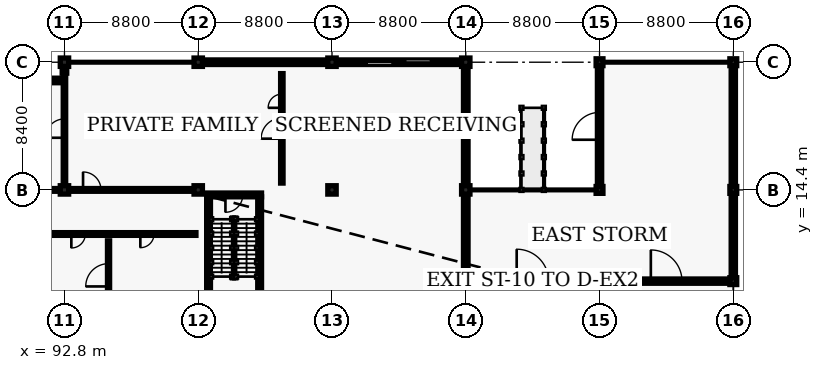
"""IFC4 building model, lengths in metres.
Left out: names, types, materials, properties, quantities, classifications, styles, units other than length and angle.
Written with IfcOpenShell. Run it as: python <this file> out.ifc"""

import sys

from ifc_helpers import new_model, si_unit, direction, frame, frame_2d, origin, origin_2d, place, context, subcontext, project, spatial, rectangle, extrude, element, fill, save


model = new_model("IFC4")
c1 = context("Model", 3, precision=1e-05, world=origin(), true_north=direction((0.0, 1.0)))
c2 = subcontext(c1, "Body", "Model", "MODEL_VIEW")
j1 = project(units=[si_unit("LENGTHUNIT", "METRE"), si_unit("PLANEANGLEUNIT", "RADIAN")], contexts=[c1])
p1 = place(None, origin())
s1 = spatial("IfcSite", under=j1, at=p1, CompositionType="ELEMENT")
p2 = place(p1, origin())
s2 = spatial("IfcBuilding", under=s1, at=p2, CompositionType="ELEMENT")
p3 = place(p2, origin())
s3 = spatial("IfcBuildingStorey", under=s2, at=p3, CompositionType="ELEMENT", Elevation=0.0)
for number, where, z_axis, x_axis in (
    (1, (92.8, 14.4, 0.0), (0.0, 0.0, 1.0), (1.0, 0.0, 0.0)),
    (2, (92.8, 22.8, 0.0), (0.0, 0.0, 1.0), (1.0, 0.0, 0.0)),
    (3, (101.6, 14.4, 0.0), (0.0, 0.0, 1.0), (1.0, 0.0, 0.0)),
    (4, (101.6, 22.8, 0.0), (0.0, 0.0, 1.0), (1.0, 0.0, 0.0)),
    (5, (110.4, 14.4, 0.0), (0.0, 0.0, 1.0), (1.0, 0.0, 0.0)),
    (6, (110.4, 22.8, 0.0), (0.0, 0.0, 1.0), (1.0, 0.0, 0.0)),
    (7, (119.2, 14.4, 0.0), (0.0, 0.0, 1.0), (1.0, 0.0, 0.0)),
    (8, (119.2, 22.8, 0.0), (0.0, 0.0, 1.0), (1.0, 0.0, 0.0)),
):
    element("IfcColumn", number, at=place(p3, frame(where, z_axis=z_axis, x_axis=x_axis)), inside=s3, PredefinedType="COLUMN", context=c2, shape_type="SweptSolid", body=[
        extrude(rectangle(XDim=0.55, YDim=0.55, at=origin_2d()), origin(), (0.0, 0.0, 1.0), 4.8),
    ])
for number, where, z_axis, x_axis in (
    (9, (128.0, 8.4, 0.0), (0.0, 0.0, 1.0), (1.0, 0.0, 0.0)),
    (10, (128.0, 14.4, 0.0), (0.0, 0.0, 1.0), (1.0, 0.0, 0.0)),
    (11, (128.0, 22.8, 0.0), (0.0, 0.0, 1.0), (1.0, 0.0, 0.0)),
    (12, (136.8, 8.4, 0.0), (0.0, 0.0, 1.0), (1.0, 0.0, 0.0)),
    (13, (136.8, 14.4, 0.0), (0.0, 0.0, 1.0), (1.0, 0.0, 0.0)),
    (14, (136.8, 22.8, 0.0), (0.0, 0.0, 1.0), (1.0, 0.0, 0.0)),
    (15, (119.2, 8.4, 0.0), (0.0, 0.0, 1.0), (1.0, 0.0, 0.0)),
):
    element("IfcColumn", number, at=place(p3, frame(where, z_axis=z_axis, x_axis=x_axis)), inside=s3, PredefinedType="COLUMN", context=c2, shape_type="SweptSolid", body=[
        extrude(rectangle(XDim=0.45, YDim=0.45, at=origin_2d()), origin(), (0.0, 0.0, 1.0), 4.8),
    ])
p4 = place(p3, frame((84.1, 21.6, 0.0), z_axis=(0.0, 0.0, 1.0), x_axis=(1.0, 0.0, 0.0)))
e16 = element("IfcWall", 16, at=p4, inside=s3, PredefinedType="SOLIDWALL", context=c2, shape_type="SweptSolid", body=[
    extrude(rectangle(XDim=8.6, YDim=0.3, at=frame_2d((4.3, 0.0))), origin(), (0.0, 0.0, 1.0), 4.35),
])
p5 = place(p4, frame((3.1, 0.0, 0.9)))
e17 = element("IfcOpeningElement", 17, at=p5, cuts=e16, PredefinedType="OPENING", context=c2, shape_type="SweptSolid", body=[
    extrude(rectangle(XDim=2.4, YDim=2.1, at=frame_2d((1.2, 1.05))), frame((0.0, 0.16, 0.0), z_axis=(0.0, -1.0, 0.0), x_axis=(1.0, 0.0, 0.0)), (0.0, 0.0, 1.0), 0.32),
])
p6 = place(p3, frame((101.7, 22.8, 0.0), z_axis=(0.0, 0.0, 1.0), x_axis=(1.0, 0.0, 0.0)))
e18 = element("IfcWall", 18, at=p6, inside=s3, PredefinedType="SOLIDWALL", context=c2, shape_type="SweptSolid", body=[
    extrude(rectangle(XDim=8.6, YDim=0.3, at=frame_2d((4.3, 0.0))), origin(), (0.0, 0.0, 1.0), 4.065),
])
p7 = place(p6, frame((3.1, 0.0, 0.9)))
e19 = element("IfcOpeningElement", 19, at=p7, cuts=e18, PredefinedType="OPENING", context=c2, shape_type="SweptSolid", body=[
    extrude(rectangle(XDim=2.4, YDim=2.1, at=frame_2d((1.2, 1.05))), frame((0.0, 0.16, 0.0), z_axis=(0.0, -1.0, 0.0), x_axis=(1.0, 0.0, 0.0)), (0.0, 0.0, 1.0), 0.32),
])
p8 = place(p3, frame((110.5, 22.8, 0.0), z_axis=(0.0, 0.0, 1.0), x_axis=(1.0, 0.0, 0.0)))
e20 = element("IfcWall", 20, at=p8, inside=s3, PredefinedType="SOLIDWALL", context=c2, shape_type="SweptSolid", body=[
    extrude(rectangle(XDim=8.6, YDim=0.3, at=frame_2d((4.3, 0.0))), origin(), (0.0, 0.0, 1.0), 4.065),
])
p9 = place(p8, frame((2.2, 0.0, 0.0)))
e21 = element("IfcOpeningElement", 21, at=p9, cuts=e20, PredefinedType="OPENING", context=c2, shape_type="SweptSolid", body=[
    extrude(rectangle(XDim=4.2, YDim=3.6, at=frame_2d((2.1, 1.8))), frame((0.0, 0.16, 0.0), z_axis=(0.0, -1.0, 0.0), x_axis=(1.0, 0.0, 0.0)), (0.0, 0.0, 1.0), 0.32),
])
for number, where, z_axis, x_axis in (
    (22, (119.2, 6.1, 0.0), (0.0, 0.0, 1.0), (0.0, 1.0, 0.0)),
    (23, (119.2, 14.5, 0.0), (0.0, 0.0, 1.0), (0.0, 1.0, 0.0)),
):
    element("IfcWall", number, at=place(p3, frame(where, z_axis=z_axis, x_axis=x_axis)), inside=s3, PredefinedType="SOLIDWALL", context=c2, shape_type="SweptSolid", body=[
        extrude(rectangle(XDim=8.2, YDim=0.3, at=frame_2d((4.1, 0.0))), origin(), (0.0, 0.0, 1.0), 4.085),
    ])
p10 = place(p3, frame((119.3, 8.4, 0.0), z_axis=(0.0, 0.0, 1.0), x_axis=(1.0, 0.0, 0.0)))
e24 = element("IfcWall", 24, at=p10, inside=s3, PredefinedType="SOLIDWALL", context=c2, shape_type="SweptSolid", body=[
    extrude(rectangle(XDim=8.6, YDim=0.28, at=frame_2d((4.3, 0.0))), origin(), (0.0, 0.0, 1.0), 4.135),
])
p11 = place(p10, frame((3.25, 0.0, 0.0)))
e25 = element("IfcOpeningElement", 25, at=p11, cuts=e24, PredefinedType="OPENING", context=c2, shape_type="SweptSolid", body=[
    extrude(rectangle(XDim=2.1, YDim=2.35, at=frame_2d((1.05, 1.175))), frame((0.0, 0.15, 0.0), z_axis=(0.0, -1.0, 0.0), x_axis=(1.0, 0.0, 0.0)), (0.0, 0.0, 1.0), 0.3),
])
p12 = place(p3, frame((128.1, 8.4, 0.0), z_axis=(0.0, 0.0, 1.0), x_axis=(1.0, 0.0, 0.0)))
e26 = element("IfcWall", 26, at=p12, inside=s3, PredefinedType="SOLIDWALL", context=c2, shape_type="SweptSolid", body=[
    extrude(rectangle(XDim=8.6, YDim=0.28, at=frame_2d((4.3, 0.0))), origin(), (0.0, 0.0, 1.0), 4.135),
])
p13 = place(p12, frame((3.275, 0.0, 0.0)))
e27 = element("IfcOpeningElement", 27, at=p13, cuts=e26, PredefinedType="OPENING", context=c2, shape_type="SweptSolid", body=[
    extrude(rectangle(XDim=2.05, YDim=2.32, at=frame_2d((1.025, 1.16))), frame((0.0, 0.15, 0.0), z_axis=(0.0, -1.0, 0.0), x_axis=(1.0, 0.0, 0.0)), (0.0, 0.0, 1.0), 0.3),
])
p14 = place(p3, frame((128.0, 14.45, 0.0), z_axis=(0.0, 0.0, 1.0), x_axis=(0.0, 1.0, 0.0)))
e28 = element("IfcWall", 28, at=p14, inside=s3, PredefinedType="SOLIDWALL", context=c2, shape_type="SweptSolid", body=[
    extrude(rectangle(XDim=8.2, YDim=0.28, at=frame_2d((4.1, 0.0))), origin(), (0.0, 0.0, 1.0), 4.085),
])
p15 = place(p14, frame((3.25, 0.0, 0.0)))
e29 = element("IfcOpeningElement", 29, at=p15, cuts=e28, PredefinedType="OPENING", context=c2, shape_type="SweptSolid", body=[
    extrude(rectangle(XDim=1.8, YDim=2.25, at=frame_2d((0.9, 1.125))), frame((0.0, 0.15, 0.0), z_axis=(0.0, -1.0, 0.0), x_axis=(1.0, 0.0, 0.0)), (0.0, 0.0, 1.0), 0.3),
])
p16 = place(p3, frame((136.8, 8.45, 0.0), z_axis=(0.0, 0.0, 1.0), x_axis=(0.0, 1.0, 0.0)))
e30 = element("IfcWall", 30, at=p16, inside=s3, PredefinedType="SOLIDWALL", context=c2, shape_type="SweptSolid", body=[
    extrude(rectangle(XDim=5.8, YDim=0.28, at=frame_2d((2.9, 0.0))), origin(), (0.0, 0.0, 1.0), 4.085),
])
p17 = place(p3, frame((136.8, 14.45, 0.0), z_axis=(0.0, 0.0, 1.0), x_axis=(0.0, 1.0, 0.0)))
e31 = element("IfcWall", 31, at=p17, inside=s3, PredefinedType="SOLIDWALL", context=c2, shape_type="SweptSolid", body=[
    extrude(rectangle(XDim=8.2, YDim=0.28, at=frame_2d((4.1, 0.0))), origin(), (0.0, 0.0, 1.0), 4.085),
])
p18 = place(p3, frame((92.8, 22.08, 0.0), z_axis=(0.0, 0.0, 1.0), x_axis=(0.0, 1.0, 0.0)))
e32 = element("IfcWall", 32, at=p18, inside=s3, PredefinedType="SOLIDWALL", context=c2, shape_type="SweptSolid", body=[
    extrude(rectangle(XDim=0.77, YDim=0.3, at=frame_2d((0.385, 0.0))), origin(), (0.0, 0.0, 1.0), 3.845),
])
p19 = place(p3, frame((102.155, 14.07, 0.0), z_axis=(0.0, 0.0, 1.0), x_axis=(1.0, 0.0, 0.0)))
e33 = element("IfcWall", 33, at=p19, inside=s3, PredefinedType="SHEAR", context=c2, shape_type="SweptSolid", body=[
    extrude(rectangle(XDim=3.61, YDim=0.25, at=frame_2d((1.805, 0.0))), origin(), (0.0, 0.0, 1.0), 4.56),
])
p20 = place(p19, frame((1.235, 0.0, 0.0)))
e34 = element("IfcOpeningElement", 34, at=p20, cuts=e33, PredefinedType="OPENING", context=c2, shape_type="SweptSolid", body=[
    extrude(rectangle(XDim=1.14, YDim=2.15, at=frame_2d((0.57, 1.075))), frame((0.0, 0.135, 0.0), z_axis=(0.0, -1.0, 0.0), x_axis=(1.0, 0.0, 0.0)), (0.0, 0.0, 1.0), 0.27),
])
for number, where, z_axis, x_axis in (
    (35, (105.64, 13.945, 0.0), (0.0, 0.0, 1.0), (0.0, -1.0, 0.0)),
    (36, (102.28, 6.555, 0.0), (0.0, 0.0, 1.0), (0.0, 1.0, 0.0)),
):
    element("IfcWall", number, at=place(p3, frame(where, z_axis=z_axis, x_axis=x_axis)), inside=s3, PredefinedType="SHEAR", context=c2, shape_type="SweptSolid", body=[
        extrude(rectangle(XDim=7.39, YDim=0.25, at=frame_2d((3.695, 0.0))), origin(), (0.0, 0.0, 1.0), 4.56),
    ])
p21 = place(p3, frame((70.5, 11.5, 0.0), z_axis=(0.0, 0.0, 1.0), x_axis=(1.0, 0.0, 0.0)))
e37 = element("IfcWall", 37, at=p21, inside=s3, PredefinedType="PARTITIONING", context=c2, shape_type="SweptSolid", body=[
    extrude(rectangle(XDim=30.95, YDim=0.18, at=frame_2d((15.475, 0.0))), origin(), (0.0, 0.0, 1.0), 3.845),
])
p22 = place(p21, frame((7.247, 0.0, 0.0)))
e38 = element("IfcOpeningElement", 38, at=p22, cuts=e37, PredefinedType="OPENING", context=c2, shape_type="SweptSolid", body=[
    extrude(rectangle(XDim=0.98, YDim=2.12, at=frame_2d((0.49, 1.06))), frame((0.0, 0.1, 0.0), z_axis=(0.0, -1.0, 0.0), x_axis=(1.0, 0.0, 0.0)), (0.0, 0.0, 1.0), 0.2),
])
p23 = place(p21, frame((15.0, 0.0, 0.0)))
e39 = element("IfcOpeningElement", 39, at=p23, cuts=e37, PredefinedType="OPENING", context=c2, shape_type="SweptSolid", body=[
    extrude(rectangle(XDim=0.95, YDim=2.12, at=frame_2d((0.475, 1.06))), frame((0.0, 0.1, 0.0), z_axis=(0.0, -1.0, 0.0), x_axis=(1.0, 0.0, 0.0)), (0.0, 0.0, 1.0), 0.2),
])
p24 = place(p21, frame((22.753, 0.0, 0.0)))
e40 = element("IfcOpeningElement", 40, at=p24, cuts=e37, PredefinedType="OPENING", context=c2, shape_type="SweptSolid", body=[
    extrude(rectangle(XDim=0.92, YDim=2.1, at=frame_2d((0.46, 1.05))), frame((0.0, 0.1, 0.0), z_axis=(0.0, -1.0, 0.0), x_axis=(1.0, 0.0, 0.0)), (0.0, 0.0, 1.0), 0.2),
])
p25 = place(p21, frame((27.292, 0.0, 0.0)))
e41 = element("IfcOpeningElement", 41, at=p25, cuts=e37, PredefinedType="OPENING", context=c2, shape_type="SweptSolid", body=[
    extrude(rectangle(XDim=0.9, YDim=2.06, at=frame_2d((0.45, 1.03))), frame((0.0, 0.1, 0.0), z_axis=(0.0, -1.0, 0.0), x_axis=(1.0, 0.0, 0.0)), (0.0, 0.0, 1.0), 0.2),
])
p26 = place(p3, frame((70.5, 14.4, 0.0), z_axis=(0.0, 0.0, 1.0), x_axis=(1.0, 0.0, 0.0)))
e42 = element("IfcWall", 42, at=p26, inside=s3, PredefinedType="PARTITIONING", context=c2, shape_type="SweptSolid", body=[
    extrude(rectangle(XDim=30.95, YDim=0.18, at=frame_2d((15.475, 0.0))), origin(), (0.0, 0.0, 1.0), 3.795),
])
p27 = place(p26, frame((7.257, 0.0, 0.0)))
e43 = element("IfcOpeningElement", 43, at=p27, cuts=e42, PredefinedType="OPENING", context=c2, shape_type="SweptSolid", body=[
    extrude(rectangle(XDim=0.96, YDim=2.08, at=frame_2d((0.48, 1.04))), frame((0.0, 0.1, 0.0), z_axis=(0.0, -1.0, 0.0), x_axis=(1.0, 0.0, 0.0)), (0.0, 0.0, 1.0), 0.2),
])
p28 = place(p26, frame((15.025, 0.0, 0.0)))
e44 = element("IfcOpeningElement", 44, at=p28, cuts=e42, PredefinedType="OPENING", context=c2, shape_type="SweptSolid", body=[
    extrude(rectangle(XDim=0.9, YDim=2.06, at=frame_2d((0.45, 1.03))), frame((0.0, 0.1, 0.0), z_axis=(0.0, -1.0, 0.0), x_axis=(1.0, 0.0, 0.0)), (0.0, 0.0, 1.0), 0.2),
])
p29 = place(p26, frame((23.523, 0.0, 0.0)))
e45 = element("IfcOpeningElement", 45, at=p29, cuts=e42, PredefinedType="OPENING", context=c2, shape_type="SweptSolid", body=[
    extrude(rectangle(XDim=1.18, YDim=2.18, at=frame_2d((0.59, 1.09))), frame((0.0, 0.1, 0.0), z_axis=(0.0, -1.0, 0.0), x_axis=(1.0, 0.0, 0.0)), (0.0, 0.0, 1.0), 0.2),
])
p30 = place(p3, frame((95.7, 6.55, 0.0), z_axis=(0.0, 0.0, 1.0), x_axis=(0.0, 1.0, 0.0)))
e46 = element("IfcWall", 46, at=p30, inside=s3, PredefinedType="PARTITIONING", context=c2, shape_type="SweptSolid", body=[
    extrude(rectangle(XDim=4.5, YDim=0.14, at=frame_2d((2.25, 0.0))), origin(), (0.0, 0.0, 1.0), 4.025),
])
p31 = place(p30, frame((1.5, 0.0, 0.0)))
e47 = element("IfcOpeningElement", 47, at=p31, cuts=e46, PredefinedType="OPENING", context=c2, shape_type="SweptSolid", body=[
    extrude(rectangle(XDim=1.5, YDim=2.25, at=frame_2d((0.75, 1.125))), frame((0.0, 0.08, 0.0), z_axis=(0.0, -1.0, 0.0), x_axis=(1.0, 0.0, 0.0)), (0.0, 0.0, 1.0), 0.16),
])
p32 = place(p3, frame((92.8, 14.85, 0.0), z_axis=(0.0, 0.0, 1.0), x_axis=(0.0, 1.0, 0.0)))
e48 = element("IfcWall", 48, at=p32, inside=s3, PredefinedType="PARTITIONING", context=c2, shape_type="SweptSolid", body=[
    extrude(rectangle(XDim=7.2, YDim=0.16, at=frame_2d((3.6, 0.0))), origin(), (0.0, 0.0, 1.0), 3.845),
])
p33 = place(p32, frame((2.98, 0.0, 0.0)))
e49 = element("IfcOpeningElement", 49, at=p33, cuts=e48, PredefinedType="OPENING", context=c2, shape_type="SweptSolid", body=[
    extrude(rectangle(XDim=1.24, YDim=2.2, at=frame_2d((0.62, 1.1))), frame((0.0, 0.09, 0.0), z_axis=(0.0, -1.0, 0.0), x_axis=(1.0, 0.0, 0.0)), (0.0, 0.0, 1.0), 0.18),
])
p34 = place(p3, frame((107.1, 14.85, 0.0), z_axis=(0.0, 0.0, 1.0), x_axis=(0.0, 1.0, 0.0)))
e50 = element("IfcWall", 50, at=p34, inside=s3, PredefinedType="PARTITIONING", context=c2, shape_type="SweptSolid", body=[
    extrude(rectangle(XDim=7.2, YDim=0.16, at=frame_2d((3.6, 0.0))), origin(), (0.0, 0.0, 1.0), 4.545),
])
p35 = place(p34, frame((2.92, 0.0, 0.0)))
e51 = element("IfcOpeningElement", 51, at=p35, cuts=e50, PredefinedType="OPENING", context=c2, shape_type="SweptSolid", body=[
    extrude(rectangle(XDim=1.36, YDim=2.22, at=frame_2d((0.68, 1.11))), frame((0.0, 0.09, 0.0), z_axis=(0.0, -1.0, 0.0), x_axis=(1.0, 0.0, 0.0)), (0.0, 0.0, 1.0), 0.18),
])
p36 = place(p34, frame((4.95, 0.0, 0.0)))
e52 = element("IfcOpeningElement", 52, at=p36, cuts=e50, PredefinedType="OPENING", context=c2, shape_type="SweptSolid", body=[
    extrude(rectangle(XDim=0.9, YDim=2.06, at=frame_2d((0.45, 1.03))), frame((0.0, 0.09, 0.0), z_axis=(0.0, -1.0, 0.0), x_axis=(1.0, 0.0, 0.0)), (0.0, 0.0, 1.0), 0.18),
])
p37 = place(p7, origin())
e53 = element("IfcWindow", 53, at=p37, inside=s3, PartitioningType="SINGLE_PANEL", PredefinedType="WINDOW", context=c2, shape_type="SweptSolid", body=[
    extrude(rectangle(XDim=2.4, YDim=2.1, at=frame_2d((1.2, 1.05))), frame((0.0, 0.03, 0.0), z_axis=(0.0, -1.0, 0.0), x_axis=(1.0, 0.0, 0.0)), (0.0, 0.0, 1.0), 0.06),
])
fill(e19, e53)
p38 = place(p20, origin())
e54 = element("IfcDoor", 54, at=p38, inside=s3, OperationType="SINGLE_SWING_RIGHT", PredefinedType="DOOR", context=c2, shape_type="SweptSolid", body=[
    extrude(rectangle(XDim=1.14, YDim=2.15, at=frame_2d((0.57, 1.075))), frame((0.0, 0.025, 0.0), z_axis=(0.0, -1.0, 0.0), x_axis=(1.0, 0.0, 0.0)), (0.0, 0.0, 1.0), 0.05),
])
fill(e34, e54)
p39 = place(p9, origin())
e55 = element("IfcDoor", 55, at=p39, inside=s3, OperationType="ROLLINGUP", PredefinedType="GATE", context=c2, shape_type="SweptSolid", body=[
    extrude(rectangle(XDim=4.2, YDim=3.6, at=frame_2d((2.1, 1.8))), frame((0.0, 0.025, 0.0), z_axis=(0.0, -1.0, 0.0), x_axis=(1.0, 0.0, 0.0)), (0.0, 0.0, 1.0), 0.05),
])
fill(e21, e55)
p40 = place(p11, origin())
e56 = element("IfcDoor", 56, at=p40, inside=s3, OperationType="DOUBLE_DOOR_SINGLE_SWING", PredefinedType="DOOR", context=c2, shape_type="SweptSolid", body=[
    extrude(rectangle(XDim=2.1, YDim=2.35, at=frame_2d((1.05, 1.175))), frame((0.0, 0.025, 0.0), z_axis=(0.0, -1.0, 0.0), x_axis=(1.0, 0.0, 0.0)), (0.0, 0.0, 1.0), 0.05),
])
fill(e25, e56)
p41 = place(p13, origin())
e57 = element("IfcDoor", 57, at=p41, inside=s3, OperationType="DOUBLE_DOOR_SINGLE_SWING", PredefinedType="GATE", context=c2, shape_type="SweptSolid", body=[
    extrude(rectangle(XDim=2.05, YDim=2.32, at=frame_2d((1.025, 1.16))), frame((0.0, 0.025, 0.0), z_axis=(0.0, -1.0, 0.0), x_axis=(1.0, 0.0, 0.0)), (0.0, 0.0, 1.0), 0.05),
])
fill(e27, e57)
p42 = place(p15, origin())
e58 = element("IfcDoor", 58, at=p42, inside=s3, OperationType="DOUBLE_DOOR_SINGLE_SWING", PredefinedType="DOOR", context=c2, shape_type="SweptSolid", body=[
    extrude(rectangle(XDim=1.8, YDim=2.25, at=frame_2d((0.9, 1.125))), frame((0.0, 0.025, 0.0), z_axis=(0.0, -1.0, 0.0), x_axis=(1.0, 0.0, 0.0)), (0.0, 0.0, 1.0), 0.05),
])
fill(e29, e58)
p43 = place(p24, origin())
e59 = element("IfcDoor", 59, at=p43, inside=s3, OperationType="SINGLE_SWING_RIGHT", PredefinedType="DOOR", context=c2, shape_type="SweptSolid", body=[
    extrude(rectangle(XDim=0.92, YDim=2.1, at=frame_2d((0.46, 1.05))), frame((0.0, 0.025, 0.0), z_axis=(0.0, -1.0, 0.0), x_axis=(1.0, 0.0, 0.0)), (0.0, 0.0, 1.0), 0.05),
])
fill(e40, e59)
p44 = place(p29, origin())
e60 = element("IfcDoor", 60, at=p44, inside=s3, OperationType="SINGLE_SWING_LEFT", PredefinedType="DOOR", context=c2, shape_type="SweptSolid", body=[
    extrude(rectangle(XDim=1.18, YDim=2.18, at=frame_2d((0.59, 1.09))), frame((0.0, 0.025, 0.0), z_axis=(0.0, -1.0, 0.0), x_axis=(1.0, 0.0, 0.0)), (0.0, 0.0, 1.0), 0.05),
])
fill(e45, e60)
p45 = place(p31, origin())
e61 = element("IfcDoor", 61, at=p45, inside=s3, OperationType="DOUBLE_DOOR_SINGLE_SWING", PredefinedType="DOOR", context=c2, shape_type="SweptSolid", body=[
    extrude(rectangle(XDim=1.5, YDim=2.25, at=frame_2d((0.75, 1.125))), frame((0.0, 0.025, 0.0), z_axis=(0.0, -1.0, 0.0), x_axis=(1.0, 0.0, 0.0)), (0.0, 0.0, 1.0), 0.05),
])
fill(e47, e61)
p46 = place(p33, origin())
e62 = element("IfcDoor", 62, at=p46, inside=s3, OperationType="SINGLE_SWING_LEFT", PredefinedType="DOOR", context=c2, shape_type="SweptSolid", body=[
    extrude(rectangle(XDim=1.24, YDim=2.2, at=frame_2d((0.62, 1.1))), frame((0.0, 0.025, 0.0), z_axis=(0.0, -1.0, 0.0), x_axis=(1.0, 0.0, 0.0)), (0.0, 0.0, 1.0), 0.05),
])
fill(e49, e62)
p47 = place(p35, origin())
e63 = element("IfcDoor", 63, at=p47, inside=s3, OperationType="DOUBLE_DOOR_SINGLE_SWING", PredefinedType="DOOR", context=c2, shape_type="SweptSolid", body=[
    extrude(rectangle(XDim=1.36, YDim=2.22, at=frame_2d((0.68, 1.11))), frame((0.0, 0.025, 0.0), z_axis=(0.0, -1.0, 0.0), x_axis=(1.0, 0.0, 0.0)), (0.0, 0.0, 1.0), 0.05),
])
fill(e51, e63)
p48 = place(p25, origin())
e64 = element("IfcDoor", 64, at=p48, inside=s3, OperationType="SINGLE_SWING_RIGHT", PredefinedType="DOOR", context=c2, shape_type="SweptSolid", body=[
    extrude(rectangle(XDim=0.9, YDim=2.06, at=frame_2d((0.45, 1.03))), frame((0.0, 0.025, 0.0), z_axis=(0.0, -1.0, 0.0), x_axis=(1.0, 0.0, 0.0)), (0.0, 0.0, 1.0), 0.05),
])
fill(e41, e64)
p49 = place(p36, origin())
e65 = element("IfcDoor", 65, at=p49, inside=s3, OperationType="SINGLE_SWING_LEFT", PredefinedType="DOOR", context=c2, shape_type="SweptSolid", body=[
    extrude(rectangle(XDim=0.9, YDim=2.06, at=frame_2d((0.45, 1.03))), frame((0.0, 0.025, 0.0), z_axis=(0.0, -1.0, 0.0), x_axis=(1.0, 0.0, 0.0)), (0.0, 0.0, 1.0), 0.05),
])
fill(e52, e65)
save(model, sys.argv[1])
